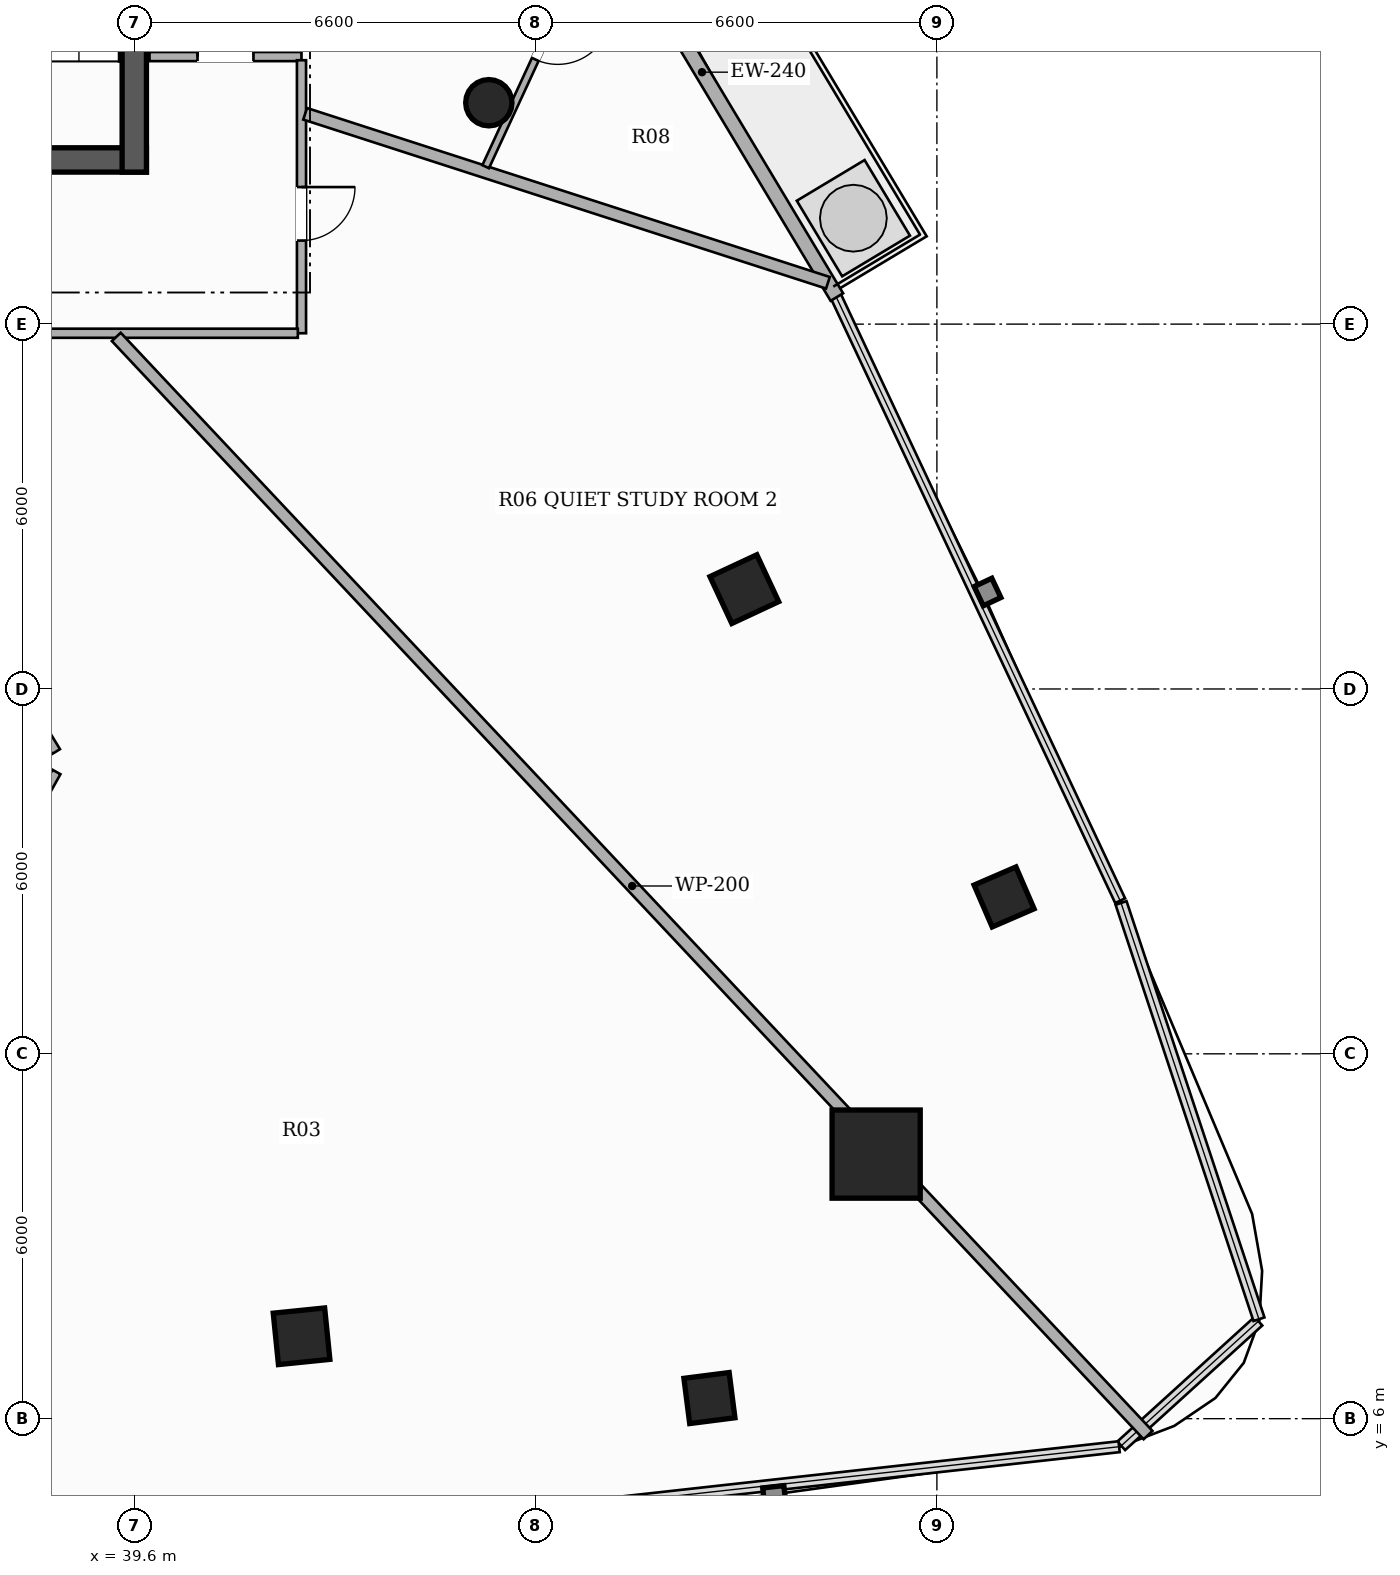
"""IFC4 building model, lengths in metres.
Left out: names, types, materials, properties, quantities, classifications, styles, units other than length and angle.
Written with IfcOpenShell. Run it as: python <this file> out.ifc"""

import sys

from ifc_helpers import new_model, si_unit, direction, frame, frame_2d, origin, origin_2d, place, context, subcontext, project, spatial, rectangle, hollow_rectangle, hollow_circle, extrude, element, fill, save


model = new_model("IFC4")
c1 = context("Model", 3, precision=1e-05, world=origin(), true_north=direction((0.0, 1.0)))
c2 = subcontext(c1, "Body", "Model", "MODEL_VIEW")
j1 = project(units=[si_unit("LENGTHUNIT", "METRE"), si_unit("PLANEANGLEUNIT", "RADIAN")], contexts=[c1])
p1 = place(None, origin())
s1 = spatial("IfcSite", under=j1, at=p1, CompositionType="ELEMENT")
p2 = place(p1, origin())
s2 = spatial("IfcBuilding", under=s1, at=p2, CompositionType="ELEMENT")
p3 = place(p2, frame((0.0, 0.0, 150.65)))
s3 = spatial("IfcBuildingStorey", under=s2, at=p3, CompositionType="ELEMENT", Elevation=150.65)
p4 = place(p3, frame((26.2, 26.7, 0.0), z_axis=(0.0, 0.0, 1.0), x_axis=(1.0, 0.0, 0.0)))
e1 = element("IfcWall", 1, at=p4, inside=s3, PredefinedType="SHEAR", context=c2, shape_type="SweptSolid", body=[
    extrude(rectangle(XDim=13.6, YDim=0.4, at=frame_2d((6.8, 0.0))), origin(), (0.0, 0.0, 1.0), 3.3),
])
p5 = place(p4, frame((4.35, 0.0, 0.0)))
e2 = element("IfcOpeningElement", 2, at=p5, cuts=e1, PredefinedType="OPENING", context=c2, shape_type="SweptSolid", body=[
    extrude(rectangle(XDim=1.05, YDim=2.15, at=frame_2d((0.525, 1.075))), frame((0.0, 0.21, 0.0), z_axis=(0.0, -1.0, 0.0), x_axis=(1.0, 0.0, 0.0)), (0.0, 0.0, 1.0), 0.42),
])
p6 = place(p4, frame((8.3, 0.0, 0.0)))
e3 = element("IfcOpeningElement", 3, at=p6, cuts=e1, PredefinedType="OPENING", context=c2, shape_type="SweptSolid", body=[
    extrude(rectangle(XDim=1.05, YDim=2.15, at=frame_2d((0.525, 1.075))), frame((0.0, 0.21, 0.0), z_axis=(0.0, -1.0, 0.0), x_axis=(1.0, 0.0, 0.0)), (0.0, 0.0, 1.0), 0.42),
])
p7 = place(p3, frame((39.6, 26.5, 0.0), z_axis=(0.0, 0.0, 1.0), x_axis=(0.0, 1.0, 0.0)))
e4 = element("IfcWall", 4, at=p7, inside=s3, PredefinedType="SHEAR", context=c2, shape_type="SweptSolid", body=[
    extrude(rectangle(XDim=7.6, YDim=0.4, at=frame_2d((3.8, 0.0))), origin(), (0.0, 0.0, 1.0), 3.3),
])
p8 = place(p3, frame((51.801, 10.351, 0.0), z_axis=(0.0, 0.0, 1.0), x_axis=(1.0, 0.0, 0.0)))
e5 = element("IfcColumn", 5, at=p8, inside=s3, PredefinedType="COLUMN", context=c2, shape_type="SweptSolid", body=[
    extrude(hollow_rectangle(XDim=1.45, YDim=1.45, WallThickness=0.045, at=origin_2d()), origin(), (0.0, 0.0, 1.0), 3.3),
])
for number, where, z_axis, x_axis in (
    (6, (42.351, 7.355, 0.0), (0.0, 0.0, 1.0), (0.995, 0.101, 0.0)),
    (7, (49.633, 19.642, 0.0), (0.0, 0.0, 1.0), (-0.423, 0.906, 0.0)),
):
    element("IfcColumn", number, at=place(p3, frame(where, z_axis=z_axis, x_axis=x_axis)), inside=s3, PredefinedType="COLUMN", context=c2, shape_type="SweptSolid", body=[
        extrude(hollow_rectangle(XDim=0.85, YDim=0.85, WallThickness=0.028, at=origin_2d()), origin(), (0.0, 0.0, 1.0), 3.3),
    ])
p9 = place(p3, frame((45.431, 27.641, 0.0), z_axis=(0.0, 0.0, 1.0), x_axis=(1.0, 0.0, 0.0)))
e8 = element("IfcColumn", 8, at=p9, inside=s3, PredefinedType="COLUMN", context=c2, shape_type="SweptSolid", body=[
    extrude(hollow_circle(Radius=0.381, WallThickness=0.022, at=origin_2d()), origin(), (0.0, 0.0, 1.0), 3.3),
])
for number, where, z_axis, x_axis in (
    (9, (49.059, 6.339, 0.0), (0.0, 0.0, 1.0), (0.992, 0.127, 0.0)),
    (10, (53.905, 14.58, 0.0), (0.0, 0.0, 1.0), (-0.397, 0.918, 0.0)),
):
    element("IfcColumn", number, at=place(p3, frame(where, z_axis=z_axis, x_axis=x_axis)), inside=s3, PredefinedType="COLUMN", context=c2, shape_type="SweptSolid", body=[
        extrude(hollow_rectangle(XDim=0.75, YDim=0.75, WallThickness=0.025, at=origin_2d()), origin(), (0.0, 0.0, 1.0), 3.3),
    ])
p10 = place(p3, frame((51.155, 24.445, 0.0), z_axis=(0.0, 0.0, 1.0), x_axis=(-0.514335781973, 0.857588889493, 0.0)))
e11 = element("IfcWall", 11, at=p10, inside=s3, PredefinedType="SOLIDWALL", context=c2, shape_type="SweptSolid", body=[
    extrude(rectangle(XDim=11.222, YDim=0.24, at=frame_2d((5.611, 0.0))), origin(), (0.0, 0.0, 1.0), 2.624),
])
p11 = place(p10, frame((8.725, 0.0, 0.0)))
e12 = element("IfcOpeningElement", 12, at=p11, cuts=e11, PredefinedType="OPENING", context=c2, shape_type="SweptSolid", body=[
    extrude(rectangle(XDim=1.8, YDim=2.2, at=frame_2d((0.9, 1.1))), frame((0.0, 0.13, 0.0), z_axis=(0.0, -1.0, 0.0), x_axis=(1.0, 0.0, 0.0)), (0.0, 0.0, 1.0), 0.26),
])
p12 = place(p3, frame((39.85, 28.4, 0.0), z_axis=(0.0, 0.0, 1.0), x_axis=(1.0, 0.0, 0.0)))
e13 = element("IfcWall", 13, at=p12, inside=s3, PredefinedType="PARTITIONING", context=c2, shape_type="SweptSolid", body=[
    extrude(rectangle(XDim=2.5, YDim=0.15, at=frame_2d((1.25, 0.0))), origin(), (0.0, 0.0, 1.0), 2.721),
])
p13 = place(p12, frame((0.79, 0.0, 0.0)))
e14 = element("IfcOpeningElement", 14, at=p13, cuts=e13, PredefinedType="OPENING", context=c2, shape_type="SweptSolid", body=[
    extrude(rectangle(XDim=0.92, YDim=2.15, at=frame_2d((0.46, 1.075))), frame((0.0, 0.085, 0.0), z_axis=(0.0, -1.0, 0.0), x_axis=(1.0, 0.0, 0.0)), (0.0, 0.0, 1.0), 0.17),
])
p14 = place(p3, frame((42.35, 28.34, 0.0), z_axis=(0.0, 0.0, 1.0), x_axis=(0.0, -1.0, 0.0)))
e15 = element("IfcWall", 15, at=p14, inside=s3, PredefinedType="PARTITIONING", context=c2, shape_type="SweptSolid", body=[
    extrude(rectangle(XDim=4.49, YDim=0.15, at=frame_2d((2.245, 0.0))), origin(), (0.0, 0.0, 1.0), 2.721),
])
p15 = place(p14, frame((2.086, 0.0, 0.0)))
e16 = element("IfcOpeningElement", 16, at=p15, cuts=e15, PredefinedType="OPENING", context=c2, shape_type="SweptSolid", body=[
    extrude(rectangle(XDim=0.88, YDim=2.1, at=frame_2d((0.44, 1.05))), frame((0.0, 0.085, 0.0), z_axis=(0.0, -1.0, 0.0), x_axis=(1.0, 0.0, 0.0)), (0.0, 0.0, 1.0), 0.17),
])
p16 = place(p3, frame((42.29, 23.85, 0.0), z_axis=(0.0, 0.0, 1.0), x_axis=(-1.0, 0.0, 0.0)))
e17 = element("IfcWall", 17, at=p16, inside=s3, PredefinedType="PARTITIONING", context=c2, shape_type="SweptSolid", body=[
    extrude(rectangle(XDim=8.179, YDim=0.15, at=frame_2d((4.089, 0.0))), origin(), (0.0, 0.0, 1.0), 2.492),
])
p17 = place(p16, frame((4.98, 0.0, 0.0)))
e18 = element("IfcOpeningElement", 18, at=p17, cuts=e17, PredefinedType="OPENING", context=c2, shape_type="SweptSolid", body=[
    extrude(rectangle(XDim=0.88, YDim=2.1, at=frame_2d((0.44, 1.05))), frame((0.0, 0.085, 0.0), z_axis=(0.0, -1.0, 0.0), x_axis=(1.0, 0.0, 0.0)), (0.0, 0.0, 1.0), 0.17),
])
p18 = place(p3, frame((34.147, 23.79, 0.0), z_axis=(0.0, 0.0, 1.0), x_axis=(0.521429001816, -0.853294671298, 0.0)))
e19 = element("IfcWall", 19, at=p18, inside=s3, PredefinedType="PARTITIONING", context=c2, shape_type="SweptSolid", body=[
    extrude(rectangle(XDim=7.991, YDim=0.15, at=frame_2d((3.996, 0.0))), origin(), (0.0, 0.0, 1.0), 2.721),
])
p19 = place(p3, frame((38.32, 16.635, 0.0), z_axis=(0.0, 0.0, 1.0), x_axis=(-0.489202035948, -0.872170492521, 0.0)))
e20 = element("IfcWall", 20, at=p19, inside=s3, PredefinedType="PARTITIONING", context=c2, shape_type="SweptSolid", body=[
    extrude(rectangle(XDim=1.018, YDim=0.15, at=frame_2d((0.509, 0.0))), origin(), (0.0, 0.0, 1.0), 3.06),
])
p20 = place(p3, frame((39.304, 23.79, 0.0), z_axis=(0.0, 0.0, 1.0), x_axis=(0.684750154022, -0.72877789934, 0.0)))
e21 = element("IfcWall", 21, at=p20, inside=s3, PredefinedType="PARTITIONING", context=c2, shape_type="SweptSolid", body=[
    extrude(rectangle(XDim=24.781, YDim=0.2, at=frame_2d((12.391, 0.0))), origin(), (0.0, 0.0, 1.0), 2.413),
])
p21 = place(p3, frame((42.41, 27.459, 0.0), z_axis=(0.0, 0.0, 1.0), x_axis=(0.951531988225, -0.307549793343, 0.0)))
e22 = element("IfcWall", 22, at=p21, inside=s3, PredefinedType="PARTITIONING", context=c2, shape_type="SweptSolid", body=[
    extrude(rectangle(XDim=9.036, YDim=0.2, at=frame_2d((4.518, 0.0))), origin(), (0.0, 0.0, 1.0), 2.413),
])
p22 = place(p3, frame((47.38, 30.915, 0.0), z_axis=(0.0, 0.0, 1.0), x_axis=(-0.419818119852, -0.907608255936, 0.0)))
e23 = element("IfcWall", 23, at=p22, inside=s3, PredefinedType="PARTITIONING", context=c2, shape_type="SweptSolid", body=[
    extrude(rectangle(XDim=4.766, YDim=0.12, at=frame_2d((2.383, 0.0))), origin(), (0.0, 0.0, 1.0), 2.413),
])
p23 = place(p22, frame((1.943, 0.0, 0.0)))
e24 = element("IfcOpeningElement", 24, at=p23, cuts=e23, PredefinedType="OPENING", context=c2, shape_type="SweptSolid", body=[
    extrude(rectangle(XDim=0.88, YDim=2.1, at=frame_2d((0.44, 1.05))), frame((0.0, 0.07, 0.0), z_axis=(0.0, -1.0, 0.0), x_axis=(1.0, 0.0, 0.0)), (0.0, 0.0, 1.0), 0.14),
])
p24 = place(p15, origin())
e25 = element("IfcDoor", 25, at=p24, inside=s3, OperationType="SINGLE_SWING_LEFT", PredefinedType="DOOR", context=c2, shape_type="SweptSolid", body=[
    extrude(rectangle(XDim=0.88, YDim=2.1, at=frame_2d((0.44, 1.05))), frame((0.0, 0.025, 0.0), z_axis=(0.0, -1.0, 0.0), x_axis=(1.0, 0.0, 0.0)), (0.0, 0.0, 1.0), 0.05),
])
fill(e16, e25)
p25 = place(p13, origin())
e26 = element("IfcDoor", 26, at=p25, inside=s3, OperationType="SINGLE_SWING_LEFT", PredefinedType="DOOR", context=c2, shape_type="SweptSolid", body=[
    extrude(rectangle(XDim=0.92, YDim=2.15, at=frame_2d((0.46, 1.075))), frame((0.0, 0.025, 0.0), z_axis=(0.0, -1.0, 0.0), x_axis=(1.0, 0.0, 0.0)), (0.0, 0.0, 1.0), 0.05),
])
fill(e14, e26)
p26 = place(p23, origin())
e27 = element("IfcDoor", 27, at=p26, inside=s3, OperationType="SINGLE_SWING_LEFT", PredefinedType="DOOR", context=c2, shape_type="SweptSolid", body=[
    extrude(rectangle(XDim=0.88, YDim=2.1, at=frame_2d((0.44, 1.05))), frame((0.0, 0.025, 0.0), z_axis=(0.0, -1.0, 0.0), x_axis=(1.0, 0.0, 0.0)), (0.0, 0.0, 1.0), 0.05),
])
fill(e24, e27)
save(model, sys.argv[1])
